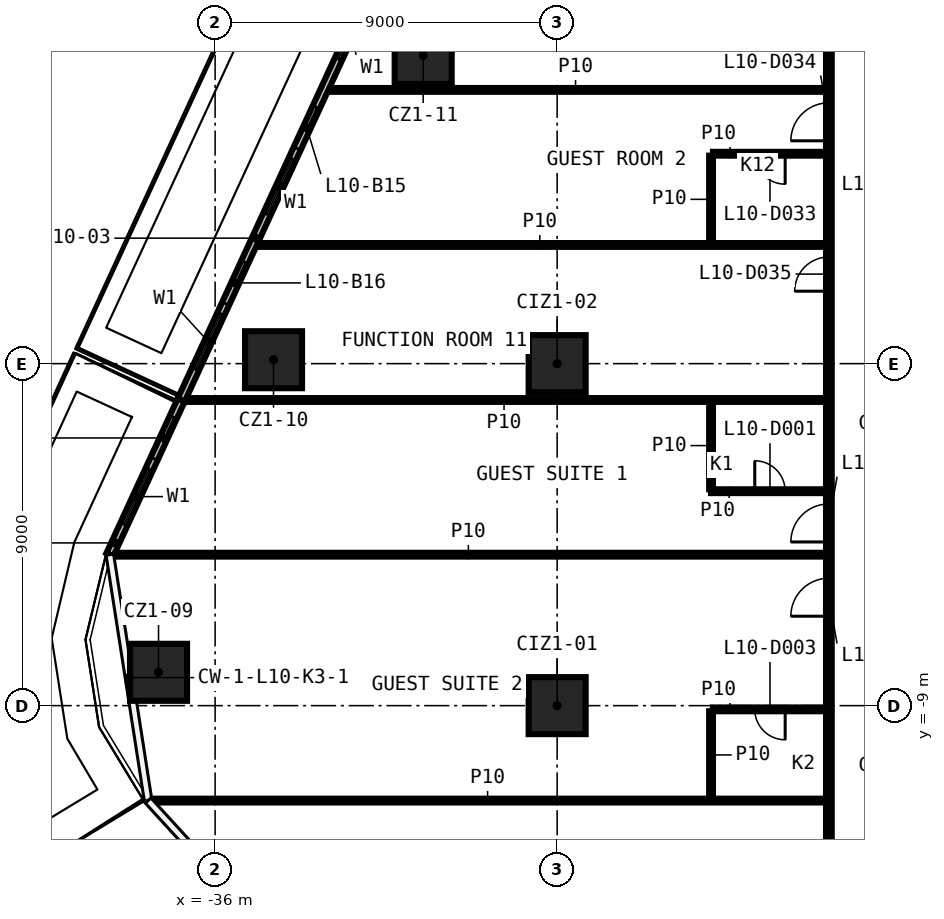
"""IFC4 building model, lengths in metres.
Left out: names, types, materials, properties, quantities, classifications, styles, units other than length and angle.
Written with IfcOpenShell. Run it as: python <this file> out.ifc"""

import sys

from ifc_helpers import new_model, si_unit, direction, frame, frame_2d, origin, origin_2d, place, context, subcontext, project, spatial, rectangle, extrude, element, fill, save


model = new_model("IFC4")
c1 = context("Model", 3, precision=1e-05, world=origin(), true_north=direction((0.0, 1.0)))
c2 = subcontext(c1, "Body", "Model", "MODEL_VIEW")
j1 = project(units=[si_unit("LENGTHUNIT", "METRE"), si_unit("PLANEANGLEUNIT", "RADIAN")], contexts=[c1])
p1 = place(None, origin())
s1 = spatial("IfcSite", under=j1, at=p1, CompositionType="ELEMENT")
p2 = place(p1, origin())
s2 = spatial("IfcBuilding", under=s1, at=p2, CompositionType="ELEMENT")
p3 = place(p2, frame((0.0, 0.0, 58.8)))
s3 = spatial("IfcBuildingStorey", under=s2, at=p3, CompositionType="ELEMENT", Elevation=58.8)
for number, where, z_axis, x_axis in (
    (1, (-37.489, -8.123, 0.0), (0.0, 0.0, 1.0), (1.0, 0.0, 0.0)),
    (2, (-34.463, 0.103, 0.0), (0.0, 0.0, 1.0), (1.0, 0.0, 0.0)),
    (3, (-30.525, 8.111, 0.0), (0.0, 0.0, 1.0), (1.0, 0.0, 0.0)),
    (4, (-27.0, -9.0, 0.0), (0.0, 0.0, 1.0), (1.0, 0.0, 0.0)),
    (5, (-27.0, 0.0, 0.0), (0.0, 0.0, 1.0), (1.0, 0.0, 0.0)),
):
    element("IfcColumn", number, at=place(p3, frame(where, z_axis=z_axis, x_axis=x_axis)), inside=s3, PredefinedType="COLUMN", context=c2, shape_type="SweptSolid", body=[
        extrude(rectangle(XDim=1.5, YDim=1.5, at=origin_2d()), origin(), (0.0, 0.0, 1.0), 3.3),
    ])
p4 = place(p3, frame((-37.736, -11.498, 0.0), z_axis=(0.0, 0.0, 1.0), x_axis=(1.0, 0.0, 0.0)))
e6 = element("IfcWall", 6, at=p4, inside=s3, PredefinedType="PARTITIONING", context=c2, shape_type="SweptSolid", body=[
    extrude(rectangle(XDim=17.811, YDim=0.1, at=frame_2d((8.905, 0.0))), origin(), (0.0, 0.0, 1.0), 3.3),
])
p5 = place(p3, frame((-19.925, -9.098, 0.0), z_axis=(0.0, 0.0, 1.0), x_axis=(-1.0, 0.0, 0.0)))
e7 = element("IfcWall", 7, at=p5, inside=s3, PredefinedType="PARTITIONING", context=c2, shape_type="SweptSolid", body=[
    extrude(rectangle(XDim=2.975, YDim=0.1, at=frame_2d((1.487, 0.0))), origin(), (0.0, 0.0, 1.0), 3.3),
])
p6 = place(p5, frame((1.075, 0.0, 0.0)))
e8 = element("IfcOpeningElement", 8, at=p6, cuts=e7, PredefinedType="OPENING", context=c2, shape_type="SweptSolid", body=[
    extrude(rectangle(XDim=0.8, YDim=2.1, at=frame_2d((0.4, 1.05))), frame((0.0, 0.06, 0.0), z_axis=(0.0, -1.0, 0.0), x_axis=(1.0, 0.0, 0.0)), (0.0, 0.0, 1.0), 0.12),
])
p7 = place(p3, frame((-38.748, -5.028, 0.0), z_axis=(0.0, 0.0, 1.0), x_axis=(1.0, 0.0, 0.0)))
e9 = element("IfcWall", 9, at=p7, inside=s3, PredefinedType="PARTITIONING", context=c2, shape_type="SweptSolid", body=[
    extrude(rectangle(XDim=18.823, YDim=0.1, at=frame_2d((9.411, 0.0))), origin(), (0.0, 0.0, 1.0), 3.3),
])
p8 = place(p3, frame((-22.95, -3.357, 0.0), z_axis=(0.0, 0.0, 1.0), x_axis=(1.0, 0.0, 0.0)))
e10 = element("IfcWall", 10, at=p8, inside=s3, PredefinedType="PARTITIONING", context=c2, shape_type="SweptSolid", body=[
    extrude(rectangle(XDim=3.025, YDim=0.1, at=frame_2d((1.512, 0.0))), origin(), (0.0, 0.0, 1.0), 3.3),
])
p9 = place(p8, frame((1.15, 0.0, 0.0)))
e11 = element("IfcOpeningElement", 11, at=p9, cuts=e10, PredefinedType="OPENING", context=c2, shape_type="SweptSolid", body=[
    extrude(rectangle(XDim=0.8, YDim=2.1, at=frame_2d((0.4, 1.05))), frame((0.0, 0.06, 0.0), z_axis=(0.0, -1.0, 0.0), x_axis=(1.0, 0.0, 0.0)), (0.0, 0.0, 1.0), 0.12),
])
p10 = place(p3, frame((-36.87, -0.957, 0.0), z_axis=(0.0, 0.0, 1.0), x_axis=(1.0, 0.0, 0.0)))
e12 = element("IfcWall", 12, at=p10, inside=s3, PredefinedType="PARTITIONING", context=c2, shape_type="SweptSolid", body=[
    extrude(rectangle(XDim=16.945, YDim=0.1, at=frame_2d((8.472, 0.0))), origin(), (0.0, 0.0, 1.0), 3.3),
])
p11 = place(p3, frame((-34.988, 3.123, 0.0), z_axis=(0.0, 0.0, 1.0), x_axis=(1.0, 0.0, 0.0)))
e13 = element("IfcWall", 13, at=p11, inside=s3, PredefinedType="PARTITIONING", context=c2, shape_type="SweptSolid", body=[
    extrude(rectangle(XDim=15.063, YDim=0.1, at=frame_2d((7.531, 0.0))), origin(), (0.0, 0.0, 1.0), 3.3),
])
p12 = place(p3, frame((-19.925, 5.523, 0.0), z_axis=(0.0, 0.0, 1.0), x_axis=(-1.0, 0.0, 0.0)))
e14 = element("IfcWall", 14, at=p12, inside=s3, PredefinedType="PARTITIONING", context=c2, shape_type="SweptSolid", body=[
    extrude(rectangle(XDim=2.975, YDim=0.1, at=frame_2d((1.487, 0.0))), origin(), (0.0, 0.0, 1.0), 3.3),
])
p13 = place(p12, frame((1.075, 0.0, 0.0)))
e15 = element("IfcOpeningElement", 15, at=p13, cuts=e14, PredefinedType="OPENING", context=c2, shape_type="SweptSolid", body=[
    extrude(rectangle(XDim=0.8, YDim=2.1, at=frame_2d((0.4, 1.05))), frame((0.0, 0.06, 0.0), z_axis=(0.0, -1.0, 0.0), x_axis=(1.0, 0.0, 0.0)), (0.0, 0.0, 1.0), 0.12),
])
p14 = place(p3, frame((-33.106, 7.203, 0.0), z_axis=(0.0, 0.0, 1.0), x_axis=(1.0, 0.0, 0.0)))
e16 = element("IfcWall", 16, at=p14, inside=s3, PredefinedType="PARTITIONING", context=c2, shape_type="SweptSolid", body=[
    extrude(rectangle(XDim=13.181, YDim=0.1, at=frame_2d((6.591, 0.0))), origin(), (0.0, 0.0, 1.0), 3.3),
])
p15 = place(p3, frame((-19.85, -16.775, 0.0), z_axis=(0.0, 0.0, 1.0), x_axis=(0.0, 1.0, 0.0)))
e17 = element("IfcWall", 17, at=p15, inside=s3, PredefinedType="PARTITIONING", context=c2, shape_type="SweptSolid", body=[
    extrude(rectangle(XDim=33.55, YDim=0.15, at=frame_2d((16.775, 0.0))), origin(), (0.0, 0.0, 1.0), 3.3),
])
p16 = place(p15, frame((12.083, 0.0, 0.0)))
e18 = element("IfcOpeningElement", 18, at=p16, cuts=e17, PredefinedType="OPENING", context=c2, shape_type="SweptSolid", body=[
    extrude(rectangle(XDim=1.0, YDim=2.1, at=frame_2d((0.5, 1.05))), frame((0.0, 0.085, 0.0), z_axis=(0.0, -1.0, 0.0), x_axis=(1.0, 0.0, 0.0)), (0.0, 0.0, 1.0), 0.17),
])
p17 = place(p15, frame((10.128, 0.0, 0.0)))
e19 = element("IfcOpeningElement", 19, at=p17, cuts=e17, PredefinedType="OPENING", context=c2, shape_type="SweptSolid", body=[
    extrude(rectangle(XDim=1.0, YDim=2.1, at=frame_2d((0.5, 1.05))), frame((0.0, 0.085, 0.0), z_axis=(0.0, -1.0, 0.0), x_axis=(1.0, 0.0, 0.0)), (0.0, 0.0, 1.0), 0.17),
])
p18 = place(p15, frame((3.259, 0.0, 0.0)))
e20 = element("IfcOpeningElement", 20, at=p18, cuts=e17, PredefinedType="OPENING", context=c2, shape_type="SweptSolid", body=[
    extrude(rectangle(XDim=0.9, YDim=2.1, at=frame_2d((0.45, 1.05))), frame((0.0, 0.085, 0.0), z_axis=(0.0, -1.0, 0.0), x_axis=(1.0, 0.0, 0.0)), (0.0, 0.0, 1.0), 0.17),
])
p19 = place(p15, frame((30.799, 0.0, 0.0)))
e21 = element("IfcOpeningElement", 21, at=p19, cuts=e17, PredefinedType="OPENING", context=c2, shape_type="SweptSolid", body=[
    extrude(rectangle(XDim=1.0, YDim=2.1, at=frame_2d((0.5, 1.05))), frame((0.0, 0.085, 0.0), z_axis=(0.0, -1.0, 0.0), x_axis=(1.0, 0.0, 0.0)), (0.0, 0.0, 1.0), 0.17),
])
p20 = place(p15, frame((22.638, 0.0, 0.0)))
e22 = element("IfcOpeningElement", 22, at=p20, cuts=e17, PredefinedType="OPENING", context=c2, shape_type="SweptSolid", body=[
    extrude(rectangle(XDim=1.0, YDim=2.1, at=frame_2d((0.5, 1.05))), frame((0.0, 0.085, 0.0), z_axis=(0.0, -1.0, 0.0), x_axis=(1.0, 0.0, 0.0)), (0.0, 0.0, 1.0), 0.17),
])
p21 = place(p15, frame((18.681, 0.0, 0.0)))
e23 = element("IfcOpeningElement", 23, at=p21, cuts=e17, PredefinedType="OPENING", context=c2, shape_type="SweptSolid", body=[
    extrude(rectangle(XDim=0.9, YDim=2.1, at=frame_2d((0.45, 1.05))), frame((0.0, 0.085, 0.0), z_axis=(0.0, -1.0, 0.0), x_axis=(1.0, 0.0, 0.0)), (0.0, 0.0, 1.0), 0.17),
])
for number, where, z_axis, x_axis in (
    (24, (-22.95, -11.448, 0.0), (0.0, 0.0, 1.0), (0.0, 1.0, 0.0)),
    (25, (-22.95, -3.307, 0.0), (0.0, 0.0, 1.0), (0.0, 1.0, 0.0)),
):
    element("IfcWall", number, at=place(p3, frame(where, z_axis=z_axis, x_axis=x_axis)), inside=s3, PredefinedType="PARTITIONING", context=c2, shape_type="SweptSolid", body=[
        extrude(rectangle(XDim=2.3, YDim=0.1, at=frame_2d((1.15, 0.0))), origin(), (0.0, 0.0, 1.0), 3.3),
    ])
p22 = place(p3, frame((-22.95, 3.173, 0.0), z_axis=(0.0, 0.0, 1.0), x_axis=(0.0, 1.0, 0.0)))
e26 = element("IfcWall", 26, at=p22, inside=s3, PredefinedType="PARTITIONING", context=c2, shape_type="SweptSolid", body=[
    extrude(rectangle(XDim=2.3, YDim=0.1, at=frame_2d((1.15, 0.0))), origin(), (0.0, 0.0, 1.0), 3.3),
])
p23 = place(p3, frame((-25.601, 23.524, 0.0), z_axis=(0.0, 0.0, 1.0), x_axis=(-0.418809499218, -0.908074117771, 0.0)))
e27 = element("IfcWall", 27, at=p23, inside=s3, PredefinedType="SOLIDWALL", context=c2, shape_type="SweptSolid", body=[
    extrude(rectangle(XDim=26.959, YDim=0.2, at=frame_2d((13.479, 0.0))), origin(), (0.0, 0.0, 1.0), 3.3),
])
p24 = place(p23, frame((2.0, 0.0, 0.6)))
e28 = element("IfcOpeningElement", 28, at=p24, cuts=e27, PredefinedType="OPENING", context=c2, shape_type="SweptSolid", body=[
    extrude(rectangle(XDim=1.6, YDim=2.4, at=frame_2d((0.8, 1.2))), frame((0.0, 0.11, 0.0), z_axis=(0.0, -1.0, 0.0), x_axis=(1.0, 0.0, 0.0)), (0.0, 0.0, 1.0), 0.22),
])
p25 = place(p23, frame((0.5, 0.0, 0.0)))
e29 = element("IfcOpeningElement", 29, at=p25, cuts=e27, PredefinedType="OPENING", context=c2, shape_type="SweptSolid", body=[
    extrude(rectangle(XDim=1.2, YDim=2.4, at=frame_2d((0.6, 1.2))), frame((0.0, 0.11, 0.0), z_axis=(0.0, -1.0, 0.0), x_axis=(1.0, 0.0, 0.0)), (0.0, 0.0, 1.0), 0.22),
])
p26 = place(p23, frame((6.493, 0.0, 0.6)))
e30 = element("IfcOpeningElement", 30, at=p26, cuts=e27, PredefinedType="OPENING", context=c2, shape_type="SweptSolid", body=[
    extrude(rectangle(XDim=1.6, YDim=2.4, at=frame_2d((0.8, 1.2))), frame((0.0, 0.11, 0.0), z_axis=(0.0, -1.0, 0.0), x_axis=(1.0, 0.0, 0.0)), (0.0, 0.0, 1.0), 0.22),
])
p27 = place(p23, frame((4.993, 0.0, 0.0)))
e31 = element("IfcOpeningElement", 31, at=p27, cuts=e27, PredefinedType="OPENING", context=c2, shape_type="SweptSolid", body=[
    extrude(rectangle(XDim=1.2, YDim=2.4, at=frame_2d((0.6, 1.2))), frame((0.0, 0.11, 0.0), z_axis=(0.0, -1.0, 0.0), x_axis=(1.0, 0.0, 0.0)), (0.0, 0.0, 1.0), 0.22),
])
p28 = place(p23, frame((10.987, 0.0, 0.6)))
e32 = element("IfcOpeningElement", 32, at=p28, cuts=e27, PredefinedType="OPENING", context=c2, shape_type="SweptSolid", body=[
    extrude(rectangle(XDim=1.6, YDim=2.4, at=frame_2d((0.8, 1.2))), frame((0.0, 0.11, 0.0), z_axis=(0.0, -1.0, 0.0), x_axis=(1.0, 0.0, 0.0)), (0.0, 0.0, 1.0), 0.22),
])
p29 = place(p23, frame((9.487, 0.0, 0.0)))
e33 = element("IfcOpeningElement", 33, at=p29, cuts=e27, PredefinedType="OPENING", context=c2, shape_type="SweptSolid", body=[
    extrude(rectangle(XDim=1.2, YDim=2.4, at=frame_2d((0.6, 1.2))), frame((0.0, 0.11, 0.0), z_axis=(0.0, -1.0, 0.0), x_axis=(1.0, 0.0, 0.0)), (0.0, 0.0, 1.0), 0.22),
])
p30 = place(p23, frame((15.48, 0.0, 0.6)))
e34 = element("IfcOpeningElement", 34, at=p30, cuts=e27, PredefinedType="OPENING", context=c2, shape_type="SweptSolid", body=[
    extrude(rectangle(XDim=1.6, YDim=2.4, at=frame_2d((0.8, 1.2))), frame((0.0, 0.11, 0.0), z_axis=(0.0, -1.0, 0.0), x_axis=(1.0, 0.0, 0.0)), (0.0, 0.0, 1.0), 0.22),
])
p31 = place(p23, frame((13.98, 0.0, 0.0)))
e35 = element("IfcOpeningElement", 35, at=p31, cuts=e27, PredefinedType="OPENING", context=c2, shape_type="SweptSolid", body=[
    extrude(rectangle(XDim=1.2, YDim=2.4, at=frame_2d((0.6, 1.2))), frame((0.0, 0.11, 0.0), z_axis=(0.0, -1.0, 0.0), x_axis=(1.0, 0.0, 0.0)), (0.0, 0.0, 1.0), 0.22),
])
p32 = place(p23, frame((19.973, 0.0, 0.6)))
e36 = element("IfcOpeningElement", 36, at=p32, cuts=e27, PredefinedType="OPENING", context=c2, shape_type="SweptSolid", body=[
    extrude(rectangle(XDim=1.6, YDim=2.4, at=frame_2d((0.8, 1.2))), frame((0.0, 0.11, 0.0), z_axis=(0.0, -1.0, 0.0), x_axis=(1.0, 0.0, 0.0)), (0.0, 0.0, 1.0), 0.22),
])
p33 = place(p23, frame((18.473, 0.0, 0.0)))
e37 = element("IfcOpeningElement", 37, at=p33, cuts=e27, PredefinedType="OPENING", context=c2, shape_type="SweptSolid", body=[
    extrude(rectangle(XDim=1.2, YDim=2.4, at=frame_2d((0.6, 1.2))), frame((0.0, 0.11, 0.0), z_axis=(0.0, -1.0, 0.0), x_axis=(1.0, 0.0, 0.0)), (0.0, 0.0, 1.0), 0.22),
])
p34 = place(p23, frame((24.466, 0.0, 0.6)))
e38 = element("IfcOpeningElement", 38, at=p34, cuts=e27, PredefinedType="OPENING", context=c2, shape_type="SweptSolid", body=[
    extrude(rectangle(XDim=1.6, YDim=2.4, at=frame_2d((0.8, 1.2))), frame((0.0, 0.11, 0.0), z_axis=(0.0, -1.0, 0.0), x_axis=(1.0, 0.0, 0.0)), (0.0, 0.0, 1.0), 0.22),
])
p35 = place(p23, frame((22.966, 0.0, 0.0)))
e39 = element("IfcOpeningElement", 39, at=p35, cuts=e27, PredefinedType="OPENING", context=c2, shape_type="SweptSolid", body=[
    extrude(rectangle(XDim=1.2, YDim=2.4, at=frame_2d((0.6, 1.2))), frame((0.0, 0.11, 0.0), z_axis=(0.0, -1.0, 0.0), x_axis=(1.0, 0.0, 0.0)), (0.0, 0.0, 1.0), 0.22),
])
p36 = place(p3, frame((-36.892, -0.957, 0.0), z_axis=(0.0, 0.0, 1.0), x_axis=(-0.418806078916, -0.908075695228, 0.0)))
e40 = element("IfcWall", 40, at=p36, inside=s3, PredefinedType="SOLIDWALL", context=c2, shape_type="SweptSolid", body=[
    extrude(rectangle(XDim=4.483, YDim=0.2, at=frame_2d((2.242, 0.0))), origin(), (0.0, 0.0, 1.0), 3.3),
])
p37 = place(p36, frame((2.0, 0.0, 0.6)))
e41 = element("IfcOpeningElement", 41, at=p37, cuts=e40, PredefinedType="OPENING", context=c2, shape_type="SweptSolid", body=[
    extrude(rectangle(XDim=1.6, YDim=2.4, at=frame_2d((0.8, 1.2))), frame((0.0, 0.11, 0.0), z_axis=(0.0, -1.0, 0.0), x_axis=(1.0, 0.0, 0.0)), (0.0, 0.0, 1.0), 0.22),
])
p38 = place(p36, frame((0.5, 0.0, 0.0)))
e42 = element("IfcOpeningElement", 42, at=p38, cuts=e40, PredefinedType="OPENING", context=c2, shape_type="SweptSolid", body=[
    extrude(rectangle(XDim=1.2, YDim=2.4, at=frame_2d((0.6, 1.2))), frame((0.0, 0.11, 0.0), z_axis=(0.0, -1.0, 0.0), x_axis=(1.0, 0.0, 0.0)), (0.0, 0.0, 1.0), 0.22),
])
p39 = place(p9, origin())
e43 = element("IfcDoor", 43, at=p39, inside=s3, OperationType="SINGLE_SWING_LEFT", PredefinedType="DOOR", context=c2, shape_type="SweptSolid", body=[
    extrude(rectangle(XDim=0.8, YDim=2.1, at=frame_2d((0.4, 1.05))), frame((0.0, 0.025, 0.0), z_axis=(0.0, -1.0, 0.0), x_axis=(1.0, 0.0, 0.0)), (0.0, 0.0, 1.0), 0.05),
])
fill(e11, e43)
p40 = place(p16, origin())
e44 = element("IfcDoor", 44, at=p40, inside=s3, OperationType="SINGLE_SWING_RIGHT", PredefinedType="DOOR", context=c2, shape_type="SweptSolid", body=[
    extrude(rectangle(XDim=1.0, YDim=2.1, at=frame_2d((0.5, 1.05))), frame((0.0, 0.025, 0.0), z_axis=(0.0, -1.0, 0.0), x_axis=(1.0, 0.0, 0.0)), (0.0, 0.0, 1.0), 0.05),
])
fill(e18, e44)
p41 = place(p6, origin())
e45 = element("IfcDoor", 45, at=p41, inside=s3, OperationType="SINGLE_SWING_RIGHT", PredefinedType="DOOR", context=c2, shape_type="SweptSolid", body=[
    extrude(rectangle(XDim=0.8, YDim=2.1, at=frame_2d((0.4, 1.05))), frame((0.0, 0.025, 0.0), z_axis=(0.0, -1.0, 0.0), x_axis=(1.0, 0.0, 0.0)), (0.0, 0.0, 1.0), 0.05),
])
fill(e8, e45)
p42 = place(p17, origin())
e46 = element("IfcDoor", 46, at=p42, inside=s3, OperationType="SINGLE_SWING_LEFT", PredefinedType="DOOR", context=c2, shape_type="SweptSolid", body=[
    extrude(rectangle(XDim=1.0, YDim=2.1, at=frame_2d((0.5, 1.05))), frame((0.0, 0.025, 0.0), z_axis=(0.0, -1.0, 0.0), x_axis=(1.0, 0.0, 0.0)), (0.0, 0.0, 1.0), 0.05),
])
fill(e19, e46)
p43 = place(p13, origin())
e47 = element("IfcDoor", 47, at=p43, inside=s3, OperationType="SINGLE_SWING_RIGHT", PredefinedType="DOOR", context=c2, shape_type="SweptSolid", body=[
    extrude(rectangle(XDim=0.8, YDim=2.1, at=frame_2d((0.4, 1.05))), frame((0.0, 0.025, 0.0), z_axis=(0.0, -1.0, 0.0), x_axis=(1.0, 0.0, 0.0)), (0.0, 0.0, 1.0), 0.05),
])
fill(e15, e47)
p44 = place(p20, origin())
e48 = element("IfcDoor", 48, at=p44, inside=s3, OperationType="SINGLE_SWING_LEFT", PredefinedType="DOOR", context=c2, shape_type="SweptSolid", body=[
    extrude(rectangle(XDim=1.0, YDim=2.1, at=frame_2d((0.5, 1.05))), frame((0.0, 0.025, 0.0), z_axis=(0.0, -1.0, 0.0), x_axis=(1.0, 0.0, 0.0)), (0.0, 0.0, 1.0), 0.05),
])
fill(e22, e48)
p45 = place(p21, origin())
e49 = element("IfcDoor", 49, at=p45, inside=s3, OperationType="SINGLE_SWING_RIGHT", PredefinedType="DOOR", context=c2, shape_type="SweptSolid", body=[
    extrude(rectangle(XDim=0.9, YDim=2.1, at=frame_2d((0.45, 1.05))), frame((0.0, 0.025, 0.0), z_axis=(0.0, -1.0, 0.0), x_axis=(1.0, 0.0, 0.0)), (0.0, 0.0, 1.0), 0.05),
])
fill(e23, e49)
p46 = place(p30, origin())
e50 = element("IfcWindow", 50, at=p46, inside=s3, PartitioningType="SINGLE_PANEL", PredefinedType="WINDOW", context=c2, shape_type="SweptSolid", body=[
    extrude(rectangle(XDim=1.6, YDim=2.4, at=frame_2d((0.8, 1.2))), frame((0.0, 0.03, 0.0), z_axis=(0.0, -1.0, 0.0), x_axis=(1.0, 0.0, 0.0)), (0.0, 0.0, 1.0), 0.06),
])
fill(e34, e50)
p47 = place(p32, origin())
e51 = element("IfcWindow", 51, at=p47, inside=s3, PartitioningType="SINGLE_PANEL", PredefinedType="WINDOW", context=c2, shape_type="SweptSolid", body=[
    extrude(rectangle(XDim=1.6, YDim=2.4, at=frame_2d((0.8, 1.2))), frame((0.0, 0.03, 0.0), z_axis=(0.0, -1.0, 0.0), x_axis=(1.0, 0.0, 0.0)), (0.0, 0.0, 1.0), 0.06),
])
fill(e36, e51)
p48 = place(p33, origin())
e52 = element("IfcDoor", 52, at=p48, inside=s3, OperationType="SLIDING_TO_LEFT", PredefinedType="DOOR", context=c2, shape_type="SweptSolid", body=[
    extrude(rectangle(XDim=1.2, YDim=2.4, at=frame_2d((0.6, 1.2))), frame((0.0, 0.025, 0.0), z_axis=(0.0, -1.0, 0.0), x_axis=(1.0, 0.0, 0.0)), (0.0, 0.0, 1.0), 0.05),
])
fill(e37, e52)
p49 = place(p34, origin())
e53 = element("IfcWindow", 53, at=p49, inside=s3, PartitioningType="SINGLE_PANEL", PredefinedType="WINDOW", context=c2, shape_type="SweptSolid", body=[
    extrude(rectangle(XDim=1.6, YDim=2.4, at=frame_2d((0.8, 1.2))), frame((0.0, 0.03, 0.0), z_axis=(0.0, -1.0, 0.0), x_axis=(1.0, 0.0, 0.0)), (0.0, 0.0, 1.0), 0.06),
])
fill(e38, e53)
p50 = place(p35, origin())
e54 = element("IfcDoor", 54, at=p50, inside=s3, OperationType="SLIDING_TO_LEFT", PredefinedType="DOOR", context=c2, shape_type="SweptSolid", body=[
    extrude(rectangle(XDim=1.2, YDim=2.4, at=frame_2d((0.6, 1.2))), frame((0.0, 0.025, 0.0), z_axis=(0.0, -1.0, 0.0), x_axis=(1.0, 0.0, 0.0)), (0.0, 0.0, 1.0), 0.05),
])
fill(e39, e54)
p51 = place(p37, origin())
e55 = element("IfcWindow", 55, at=p51, inside=s3, PartitioningType="SINGLE_PANEL", PredefinedType="WINDOW", context=c2, shape_type="SweptSolid", body=[
    extrude(rectangle(XDim=1.6, YDim=2.4, at=frame_2d((0.8, 1.2))), frame((0.0, 0.03, 0.0), z_axis=(0.0, -1.0, 0.0), x_axis=(1.0, 0.0, 0.0)), (0.0, 0.0, 1.0), 0.06),
])
fill(e41, e55)
p52 = place(p38, origin())
e56 = element("IfcDoor", 56, at=p52, inside=s3, OperationType="SLIDING_TO_LEFT", PredefinedType="DOOR", context=c2, shape_type="SweptSolid", body=[
    extrude(rectangle(XDim=1.2, YDim=2.4, at=frame_2d((0.6, 1.2))), frame((0.0, 0.025, 0.0), z_axis=(0.0, -1.0, 0.0), x_axis=(1.0, 0.0, 0.0)), (0.0, 0.0, 1.0), 0.05),
])
fill(e42, e56)
save(model, sys.argv[1])
